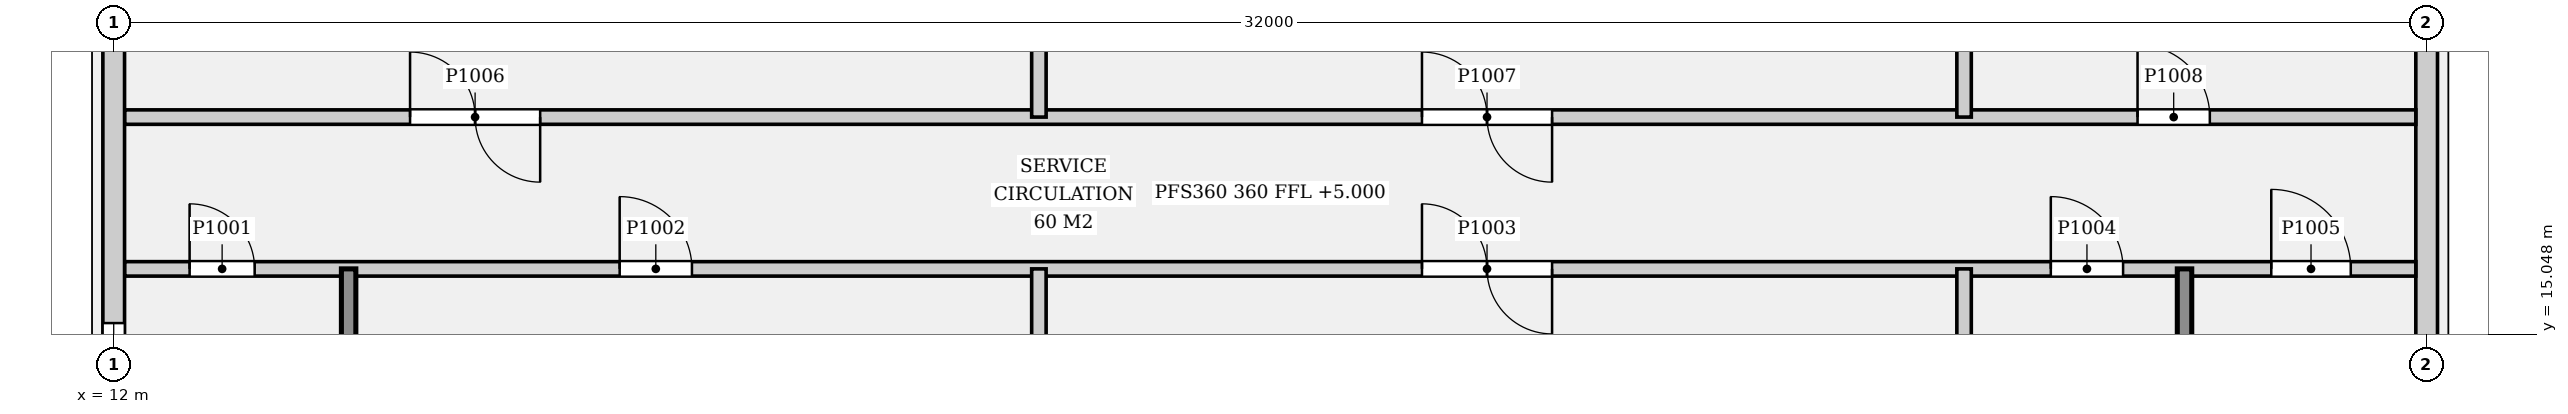
"""IFC4 building model, lengths in metres.
Left out: names, types, materials, properties, quantities, classifications, styles, units other than length and angle.
Written with IfcOpenShell. Run it as: python <this file> out.ifc"""

import sys

from ifc_helpers import new_model, si_unit, direction, frame, frame_2d, origin, place, context, subcontext, project, spatial, rectangle, extrude, element, fill, save


model = new_model("IFC4")
c1 = context("Model", 3, precision=1e-05, world=origin(), true_north=direction((0.0, 1.0)))
c2 = subcontext(c1, "Body", "Model", "MODEL_VIEW")
j1 = project(units=[si_unit("LENGTHUNIT", "METRE"), si_unit("PLANEANGLEUNIT", "RADIAN")], contexts=[c1])
p1 = place(None, origin())
s1 = spatial("IfcSite", under=j1, at=p1, CompositionType="ELEMENT")
p2 = place(p1, origin())
s2 = spatial("IfcBuilding", under=s1, at=p2, CompositionType="ELEMENT")
p3 = place(p2, frame((0.0, 0.0, 5.0)))
s3 = spatial("IfcBuildingStorey", under=s2, at=p3, CompositionType="ELEMENT", Elevation=5.0)
p4 = place(p3, frame((12.0, 13.25, 0.0), z_axis=(0.0, 0.0, 1.0), x_axis=(0.0, 1.0, 0.0)))
e1 = element("IfcWall", 1, at=p4, inside=s3, PredefinedType="SOLIDWALL", context=c2, shape_type="SweptSolid", body=[
    extrude(rectangle(XDim=7.5, YDim=0.3, at=frame_2d((3.75, 0.0))), origin(), (0.0, 0.0, 1.0), 3.98),
])
p5 = place(p4, frame((0.55, 0.0, 1.2)))
e2 = element("IfcOpeningElement", 2, at=p5, cuts=e1, PredefinedType="OPENING", context=c2, shape_type="SweptSolid", body=[
    extrude(rectangle(XDim=1.4, YDim=1.2, at=frame_2d((0.7, 0.6))), frame((0.0, 0.16, 0.0), z_axis=(0.0, -1.0, 0.0), x_axis=(1.0, 0.0, 0.0)), (0.0, 0.0, 1.0), 0.32),
])
p6 = place(p3, frame((44.0, 13.25, 0.0), z_axis=(0.0, 0.0, 1.0), x_axis=(0.0, 1.0, 0.0)))
e3 = element("IfcWall", 3, at=p6, inside=s3, PredefinedType="SOLIDWALL", context=c2, shape_type="SweptSolid", body=[
    extrude(rectangle(XDim=7.5, YDim=0.3, at=frame_2d((3.75, 0.0))), origin(), (0.0, 0.0, 1.0), 3.98),
])
p7 = place(p3, frame((12.15, 15.95, 0.0), z_axis=(0.0, 0.0, 1.0), x_axis=(1.0, 0.0, 0.0)))
e4 = element("IfcWall", 4, at=p7, inside=s3, PredefinedType="PARTITIONING", context=c2, shape_type="SweptSolid", body=[
    extrude(rectangle(XDim=31.7, YDim=0.2, at=frame_2d((15.85, 0.0))), origin(), (0.0, 0.0, 1.0), 3.98),
])
p8 = place(p7, frame((0.9, 0.0, 0.0)))
e5 = element("IfcOpeningElement", 5, at=p8, cuts=e4, PredefinedType="OPENING", context=c2, shape_type="SweptSolid", body=[
    extrude(rectangle(XDim=0.9, YDim=2.1, at=frame_2d((0.45, 1.05))), frame((0.0, 0.11, 0.0), z_axis=(0.0, -1.0, 0.0), x_axis=(1.0, 0.0, 0.0)), (0.0, 0.0, 1.0), 0.22),
])
p9 = place(p7, frame((6.85, 0.0, 0.0)))
e6 = element("IfcOpeningElement", 6, at=p9, cuts=e4, PredefinedType="OPENING", context=c2, shape_type="SweptSolid", body=[
    extrude(rectangle(XDim=1.0, YDim=2.1, at=frame_2d((0.5, 1.05))), frame((0.0, 0.11, 0.0), z_axis=(0.0, -1.0, 0.0), x_axis=(1.0, 0.0, 0.0)), (0.0, 0.0, 1.0), 0.22),
])
p10 = place(p7, frame((17.95, 0.0, 0.0)))
e7 = element("IfcOpeningElement", 7, at=p10, cuts=e4, PredefinedType="OPENING", context=c2, shape_type="SweptSolid", body=[
    extrude(rectangle(XDim=1.8, YDim=2.4, at=frame_2d((0.9, 1.2))), frame((0.0, 0.11, 0.0), z_axis=(0.0, -1.0, 0.0), x_axis=(1.0, 0.0, 0.0)), (0.0, 0.0, 1.0), 0.22),
])
p11 = place(p7, frame((26.65, 0.0, 0.0)))
e8 = element("IfcOpeningElement", 8, at=p11, cuts=e4, PredefinedType="OPENING", context=c2, shape_type="SweptSolid", body=[
    extrude(rectangle(XDim=1.0, YDim=2.1, at=frame_2d((0.5, 1.05))), frame((0.0, 0.11, 0.0), z_axis=(0.0, -1.0, 0.0), x_axis=(1.0, 0.0, 0.0)), (0.0, 0.0, 1.0), 0.22),
])
p12 = place(p7, frame((29.7, 0.0, 0.0)))
e9 = element("IfcOpeningElement", 9, at=p12, cuts=e4, PredefinedType="OPENING", context=c2, shape_type="SweptSolid", body=[
    extrude(rectangle(XDim=1.1, YDim=2.1, at=frame_2d((0.55, 1.05))), frame((0.0, 0.11, 0.0), z_axis=(0.0, -1.0, 0.0), x_axis=(1.0, 0.0, 0.0)), (0.0, 0.0, 1.0), 0.22),
])
p13 = place(p3, frame((12.15, 18.05, 0.0), z_axis=(0.0, 0.0, 1.0), x_axis=(1.0, 0.0, 0.0)))
e10 = element("IfcWall", 10, at=p13, inside=s3, PredefinedType="PARTITIONING", context=c2, shape_type="SweptSolid", body=[
    extrude(rectangle(XDim=31.7, YDim=0.2, at=frame_2d((15.85, 0.0))), origin(), (0.0, 0.0, 1.0), 3.98),
])
p14 = place(p13, frame((3.95, 0.0, 0.0)))
e11 = element("IfcOpeningElement", 11, at=p14, cuts=e10, PredefinedType="OPENING", context=c2, shape_type="SweptSolid", body=[
    extrude(rectangle(XDim=1.8, YDim=2.4, at=frame_2d((0.9, 1.2))), frame((0.0, 0.11, 0.0), z_axis=(0.0, -1.0, 0.0), x_axis=(1.0, 0.0, 0.0)), (0.0, 0.0, 1.0), 0.22),
])
p15 = place(p13, frame((17.95, 0.0, 0.0)))
e12 = element("IfcOpeningElement", 12, at=p15, cuts=e10, PredefinedType="OPENING", context=c2, shape_type="SweptSolid", body=[
    extrude(rectangle(XDim=1.8, YDim=2.4, at=frame_2d((0.9, 1.2))), frame((0.0, 0.11, 0.0), z_axis=(0.0, -1.0, 0.0), x_axis=(1.0, 0.0, 0.0)), (0.0, 0.0, 1.0), 0.22),
])
p16 = place(p13, frame((27.85, 0.0, 0.0)))
e13 = element("IfcOpeningElement", 13, at=p16, cuts=e10, PredefinedType="OPENING", context=c2, shape_type="SweptSolid", body=[
    extrude(rectangle(XDim=1.0, YDim=2.1, at=frame_2d((0.5, 1.05))), frame((0.0, 0.11, 0.0), z_axis=(0.0, -1.0, 0.0), x_axis=(1.0, 0.0, 0.0)), (0.0, 0.0, 1.0), 0.22),
])
p17 = place(p3, frame((15.25, 5.15, 0.0), z_axis=(0.0, 0.0, 1.0), x_axis=(0.0, 1.0, 0.0)))
e14 = element("IfcWall", 14, at=p17, inside=s3, PredefinedType="SOLIDWALL", context=c2, shape_type="SweptSolid", body=[
    extrude(rectangle(XDim=10.8, YDim=0.2, at=frame_2d((5.4, 0.0))), origin(), (0.0, 0.0, 1.0), 3.98),
])
p18 = place(p17, frame((0.1, 0.0, 0.0)))
e15 = element("IfcOpeningElement", 15, at=p18, cuts=e14, PredefinedType="OPENING", context=c2, shape_type="SweptSolid", body=[
    extrude(rectangle(XDim=1.1, YDim=2.1, at=frame_2d((0.55, 1.05))), frame((0.0, 0.11, 0.0), z_axis=(0.0, -1.0, 0.0), x_axis=(1.0, 0.0, 0.0)), (0.0, 0.0, 1.0), 0.22),
])
for number, where, z_axis, x_axis in (
    (16, (24.8, 13.25, 0.0), (0.0, 0.0, 1.0), (0.0, 1.0, 0.0)),
    (17, (37.6, 13.25, 0.0), (0.0, 0.0, 1.0), (0.0, 1.0, 0.0)),
):
    element("IfcWall", number, at=place(p3, frame(where, z_axis=z_axis, x_axis=x_axis)), inside=s3, PredefinedType="PARTITIONING", context=c2, shape_type="SweptSolid", body=[
        extrude(rectangle(XDim=2.7, YDim=0.2, at=frame_2d((1.35, 0.0))), origin(), (0.0, 0.0, 1.0), 3.98),
    ])
p19 = place(p3, frame((40.65, 5.15, 0.0), z_axis=(0.0, 0.0, 1.0), x_axis=(0.0, 1.0, 0.0)))
e18 = element("IfcWall", 18, at=p19, inside=s3, PredefinedType="SOLIDWALL", context=c2, shape_type="SweptSolid", body=[
    extrude(rectangle(XDim=10.8, YDim=0.2, at=frame_2d((5.4, 0.0))), origin(), (0.0, 0.0, 1.0), 3.98),
])
p20 = place(p19, frame((1.7, 0.0, 0.0)))
e19 = element("IfcOpeningElement", 19, at=p20, cuts=e18, PredefinedType="OPENING", context=c2, shape_type="SweptSolid", body=[
    extrude(rectangle(XDim=0.9, YDim=2.1, at=frame_2d((0.45, 1.05))), frame((0.0, 0.11, 0.0), z_axis=(0.0, -1.0, 0.0), x_axis=(1.0, 0.0, 0.0)), (0.0, 0.0, 1.0), 0.22),
])
for number, where, z_axis, x_axis in (
    (20, (24.8, 18.05, 0.0), (0.0, 0.0, 1.0), (0.0, 1.0, 0.0)),
    (21, (37.6, 18.05, 0.0), (0.0, 0.0, 1.0), (0.0, 1.0, 0.0)),
):
    element("IfcWall", number, at=place(p3, frame(where, z_axis=z_axis, x_axis=x_axis)), inside=s3, PredefinedType="PARTITIONING", context=c2, shape_type="SweptSolid", body=[
        extrude(rectangle(XDim=2.7, YDim=0.2, at=frame_2d((1.35, 0.0))), origin(), (0.0, 0.0, 1.0), 3.98),
    ])
p21 = place(p5, origin())
e22 = element("IfcWindow", 22, at=p21, inside=s3, PartitioningType="SINGLE_PANEL", PredefinedType="USERDEFINED", context=c2, shape_type="SweptSolid", body=[
    extrude(rectangle(XDim=1.4, YDim=1.2, at=frame_2d((0.7, 0.6))), frame((0.0, 0.03, 0.0), z_axis=(0.0, -1.0, 0.0), x_axis=(1.0, 0.0, 0.0)), (0.0, 0.0, 1.0), 0.06),
])
fill(e2, e22)
p22 = place(p8, origin())
e23 = element("IfcDoor", 23, at=p22, inside=s3, OperationType="SINGLE_SWING_LEFT", PredefinedType="DOOR", context=c2, shape_type="SweptSolid", body=[
    extrude(rectangle(XDim=0.9, YDim=2.1, at=frame_2d((0.45, 1.05))), frame((0.0, 0.025, 0.0), z_axis=(0.0, -1.0, 0.0), x_axis=(1.0, 0.0, 0.0)), (0.0, 0.0, 1.0), 0.05),
])
fill(e5, e23)
p23 = place(p9, origin())
e24 = element("IfcDoor", 24, at=p23, inside=s3, OperationType="SINGLE_SWING_LEFT", PredefinedType="DOOR", context=c2, shape_type="SweptSolid", body=[
    extrude(rectangle(XDim=1.0, YDim=2.1, at=frame_2d((0.5, 1.05))), frame((0.0, 0.025, 0.0), z_axis=(0.0, -1.0, 0.0), x_axis=(1.0, 0.0, 0.0)), (0.0, 0.0, 1.0), 0.05),
])
fill(e6, e24)
p24 = place(p10, origin())
e25 = element("IfcDoor", 25, at=p24, inside=s3, OperationType="DOUBLE_DOOR_SINGLE_SWING", PredefinedType="DOOR", context=c2, shape_type="SweptSolid", body=[
    extrude(rectangle(XDim=1.8, YDim=2.4, at=frame_2d((0.9, 1.2))), frame((0.0, 0.025, 0.0), z_axis=(0.0, -1.0, 0.0), x_axis=(1.0, 0.0, 0.0)), (0.0, 0.0, 1.0), 0.05),
])
fill(e7, e25)
p25 = place(p11, origin())
e26 = element("IfcDoor", 26, at=p25, inside=s3, OperationType="SINGLE_SWING_LEFT", PredefinedType="DOOR", context=c2, shape_type="SweptSolid", body=[
    extrude(rectangle(XDim=1.0, YDim=2.1, at=frame_2d((0.5, 1.05))), frame((0.0, 0.025, 0.0), z_axis=(0.0, -1.0, 0.0), x_axis=(1.0, 0.0, 0.0)), (0.0, 0.0, 1.0), 0.05),
])
fill(e8, e26)
p26 = place(p12, origin())
e27 = element("IfcDoor", 27, at=p26, inside=s3, OperationType="SINGLE_SWING_LEFT", PredefinedType="DOOR", context=c2, shape_type="SweptSolid", body=[
    extrude(rectangle(XDim=1.1, YDim=2.1, at=frame_2d((0.55, 1.05))), frame((0.0, 0.025, 0.0), z_axis=(0.0, -1.0, 0.0), x_axis=(1.0, 0.0, 0.0)), (0.0, 0.0, 1.0), 0.05),
])
fill(e9, e27)
p27 = place(p14, origin())
e28 = element("IfcDoor", 28, at=p27, inside=s3, OperationType="DOUBLE_DOOR_SINGLE_SWING", PredefinedType="DOOR", context=c2, shape_type="SweptSolid", body=[
    extrude(rectangle(XDim=1.8, YDim=2.4, at=frame_2d((0.9, 1.2))), frame((0.0, 0.025, 0.0), z_axis=(0.0, -1.0, 0.0), x_axis=(1.0, 0.0, 0.0)), (0.0, 0.0, 1.0), 0.05),
])
fill(e11, e28)
p28 = place(p15, origin())
e29 = element("IfcDoor", 29, at=p28, inside=s3, OperationType="DOUBLE_DOOR_SINGLE_SWING", PredefinedType="DOOR", context=c2, shape_type="SweptSolid", body=[
    extrude(rectangle(XDim=1.8, YDim=2.4, at=frame_2d((0.9, 1.2))), frame((0.0, 0.025, 0.0), z_axis=(0.0, -1.0, 0.0), x_axis=(1.0, 0.0, 0.0)), (0.0, 0.0, 1.0), 0.05),
])
fill(e12, e29)
p29 = place(p16, origin())
e30 = element("IfcDoor", 30, at=p29, inside=s3, OperationType="SINGLE_SWING_LEFT", PredefinedType="DOOR", context=c2, shape_type="SweptSolid", body=[
    extrude(rectangle(XDim=1.0, YDim=2.1, at=frame_2d((0.5, 1.05))), frame((0.0, 0.025, 0.0), z_axis=(0.0, -1.0, 0.0), x_axis=(1.0, 0.0, 0.0)), (0.0, 0.0, 1.0), 0.05),
])
fill(e13, e30)
save(model, sys.argv[1])
